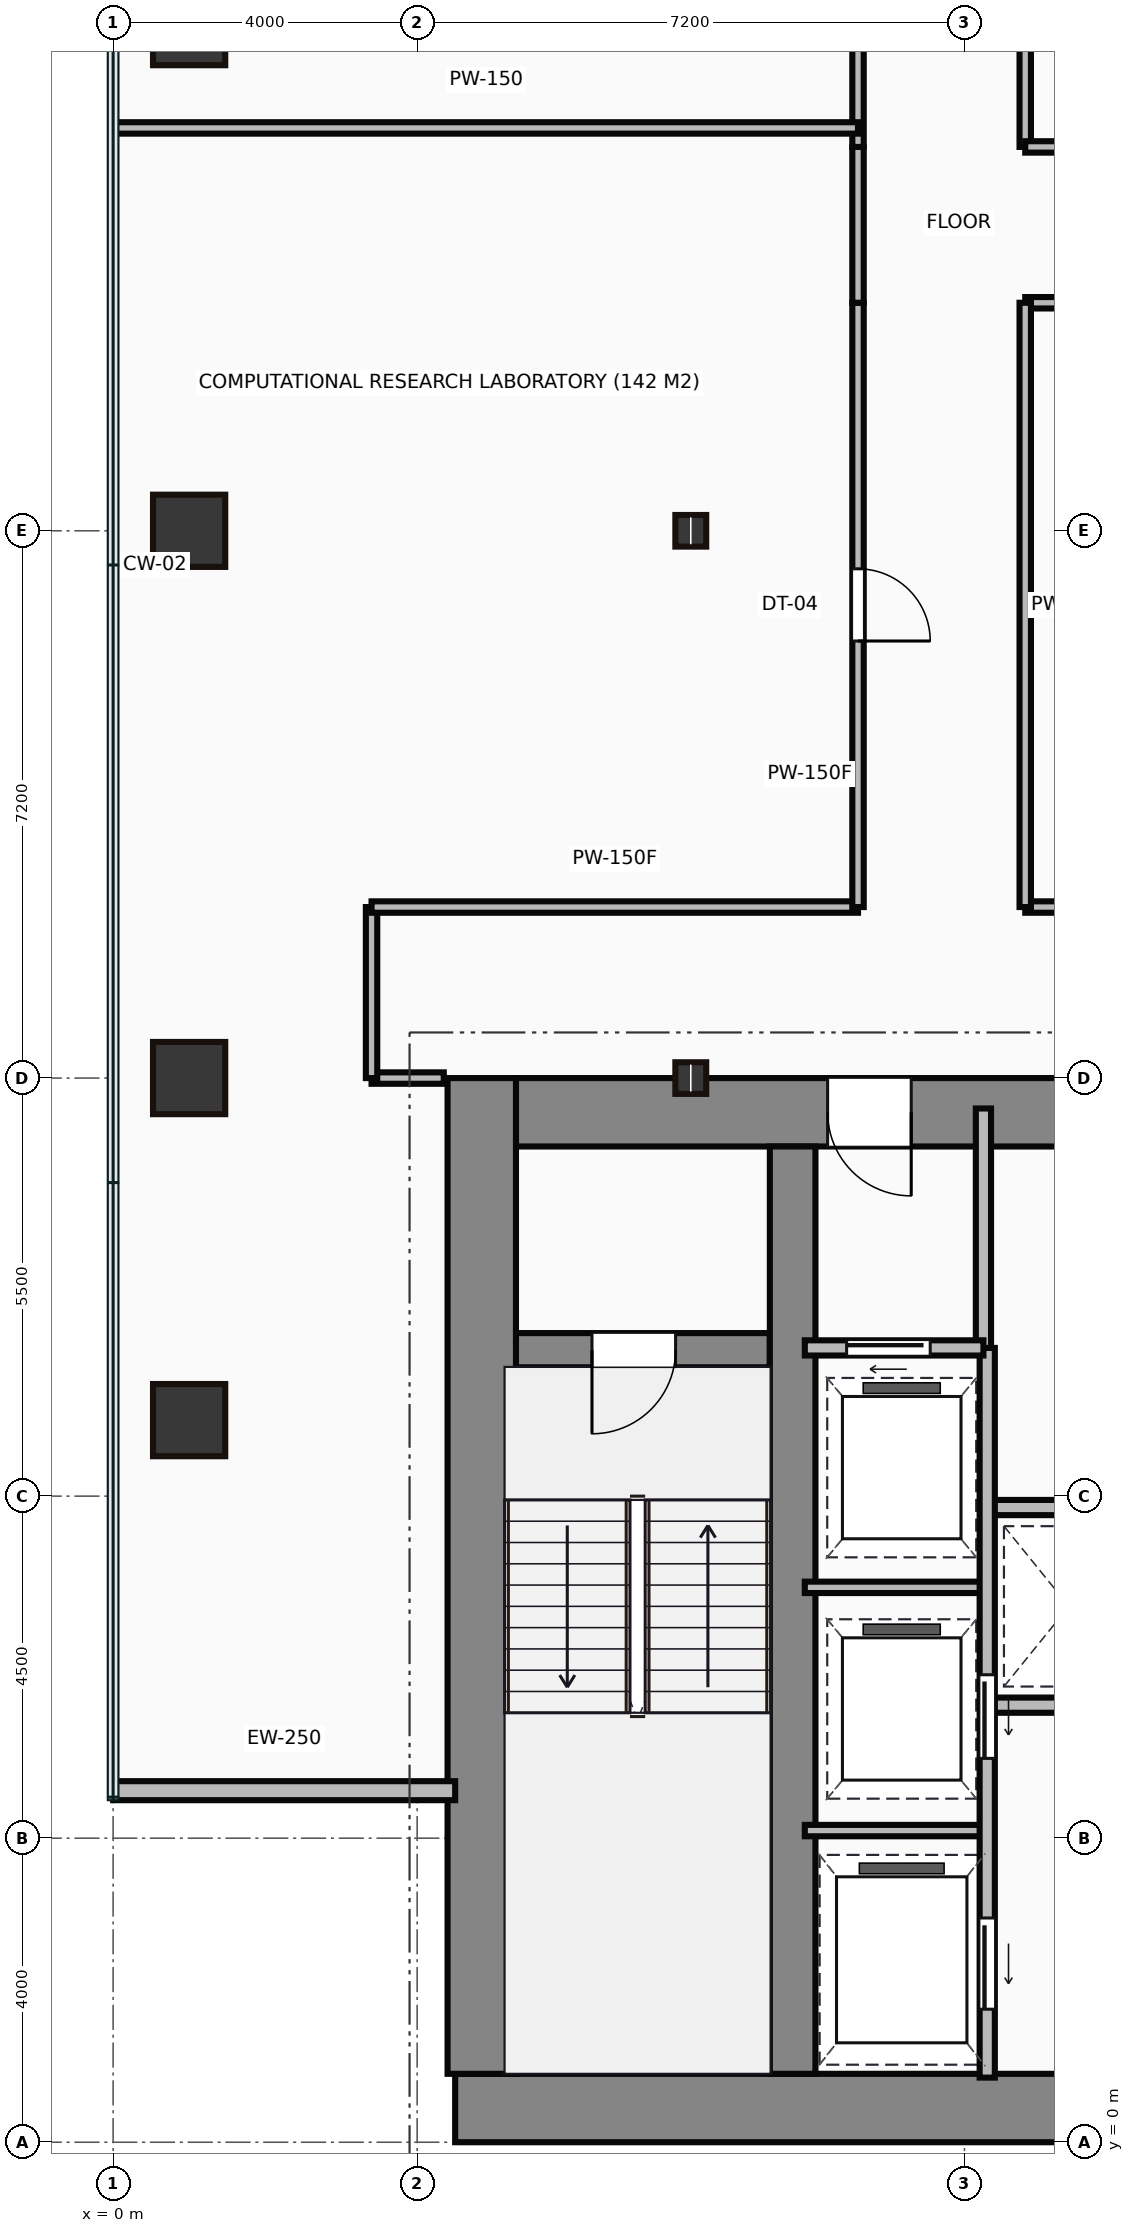
"""IFC4 building model, lengths in metres.
Left out: names, types, materials, properties, quantities, classifications, styles, units other than length and angle.
Written with IfcOpenShell. Run it as: python <this file> out.ifc"""

import sys

from ifc_helpers import new_model, si_unit, direction, frame, frame_2d, origin, origin_2d, place, context, subcontext, project, spatial, rectangle, hollow_rectangle, i_section, extrude, source, transform, mapped, element, fill, save


model = new_model("IFC4")
c1 = context("Model", 3, precision=1e-05, world=origin(), true_north=direction((0.0, 1.0)))
c2 = subcontext(c1, "Body", "Model", "MODEL_VIEW")
j1 = project(units=[si_unit("LENGTHUNIT", "METRE"), si_unit("PLANEANGLEUNIT", "RADIAN")], contexts=[c1])
p1 = place(None, origin())
s1 = spatial("IfcSite", under=j1, at=p1, CompositionType="ELEMENT")
p2 = place(p1, origin())
s2 = spatial("IfcBuilding", under=s1, at=p2, CompositionType="ELEMENT")
p3 = place(p2, frame((0.0, 0.0, 61.7)))
s3 = spatial("IfcBuildingStorey", under=s2, at=p3, CompositionType="ELEMENT", Elevation=61.7)
m1 = source(origin(), c2, "Body", "SweptSolid", [
    extrude(rectangle(XDim=29.5, YDim=0.9, at=frame_2d((14.75, 0.0))), origin(), (0.0, 0.0, 1.0), 3.65),
])
p4 = place(p3, frame((4.5, 0.45, 0.0), z_axis=(0.0, 0.0, 1.0), x_axis=(1.0, 0.0, 0.0)))
e1 = element("IfcWall", 1, at=p4, inside=s3, PredefinedType="SHEAR", context=c2, shape_type="MappedRepresentation", body=[
    mapped(m1, transform((0.0, 0.0, 0.0))),
])
m2 = source(origin(), c2, "Body", "SweptSolid", [
    extrude(rectangle(XDim=13.1, YDim=0.9, at=frame_2d((6.55, 0.0))), origin(), (0.0, 0.0, 1.0), 3.65),
])
p5 = place(p3, frame((4.85, 0.9, 0.0), z_axis=(0.0, 0.0, 1.0), x_axis=(0.0, 1.0, 0.0)))
e2 = element("IfcWall", 2, at=p5, inside=s3, PredefinedType="SHEAR", context=c2, shape_type="MappedRepresentation", body=[
    mapped(m2, transform((0.0, 0.0, 0.0))),
])
m3 = source(origin(), c2, "Body", "SweptSolid", [
    extrude(rectangle(XDim=9.1, YDim=0.9, at=frame_2d((4.55, 0.0))), origin(), (0.0, 0.0, 1.0), 3.65),
])
p6 = place(p3, frame((5.3, 13.55, 0.0), z_axis=(0.0, 0.0, 1.0), x_axis=(1.0, 0.0, 0.0)))
e3 = element("IfcWall", 3, at=p6, inside=s3, PredefinedType="SHEAR", context=c2, shape_type="MappedRepresentation", body=[
    mapped(m3, transform((0.0, 0.0, 0.0))),
])
p7 = place(p6, frame((4.1, 0.0, 0.0)))
e4 = element("IfcOpeningElement", 4, at=p7, cuts=e3, PredefinedType="OPENING", context=c2, shape_type="SweptSolid", body=[
    extrude(rectangle(XDim=1.1, YDim=2.15, at=frame_2d((0.55, 1.075))), frame((0.0, 0.46, 0.0), z_axis=(0.0, -1.0, 0.0), x_axis=(1.0, 0.0, 0.0)), (0.0, 0.0, 1.0), 0.92),
])
m4 = source(origin(), c2, "Body", "SweptSolid", [
    extrude(rectangle(XDim=12.2, YDim=0.6, at=frame_2d((6.1, 0.0))), origin(), (0.0, 0.0, 1.0), 3.65),
])
p8 = place(p3, frame((8.94, 0.9, 0.0), z_axis=(0.0, 0.0, 1.0), x_axis=(0.0, 1.0, 0.0)))
e5 = element("IfcWall", 5, at=p8, inside=s3, PredefinedType="SHEAR", context=c2, shape_type="MappedRepresentation", body=[
    mapped(m4, transform((0.0, 0.0, 0.0))),
])
m5 = source(origin(), c2, "Body", "SweptSolid", [
    extrude(rectangle(XDim=3.39, YDim=0.45, at=frame_2d((1.695, 0.0))), origin(), (0.0, 0.0, 1.0), 3.65),
])
p9 = place(p3, frame((5.25, 10.42, 0.0), z_axis=(0.0, 0.0, 1.0), x_axis=(1.0, 0.0, 0.0)))
e6 = element("IfcWall", 6, at=p9, inside=s3, PredefinedType="SHEAR", context=c2, shape_type="MappedRepresentation", body=[
    mapped(m5, transform((0.0, 0.0, 0.0))),
])
p10 = place(p9, frame((1.05, 0.0, 0.0)))
e7 = element("IfcOpeningElement", 7, at=p10, cuts=e6, PredefinedType="OPENING", context=c2, shape_type="SweptSolid", body=[
    extrude(rectangle(XDim=1.1, YDim=2.15, at=frame_2d((0.55, 1.075))), frame((0.0, 0.235, 0.0), z_axis=(0.0, -1.0, 0.0), x_axis=(1.0, 0.0, 0.0)), (0.0, 0.0, 1.0), 0.47),
])
m6 = source(origin(), c2, "Body", "SweptSolid", [
    extrude(hollow_rectangle(XDim=0.95, YDim=0.95, WallThickness=0.045, at=origin_2d()), origin(), (0.0, 0.0, 1.0), 3.65),
])
for number, where, z_axis, x_axis in (
    (8, (1.0, 9.5, 0.0), (0.0, 0.0, 1.0), (1.0, 0.0, 0.0)),
    (9, (1.0, 14.0, 0.0), (0.0, 0.0, 1.0), (1.0, 0.0, 0.0)),
    (10, (1.0, 21.2, 0.0), (0.0, 0.0, 1.0), (1.0, 0.0, 0.0)),
    (11, (1.0, 27.8, 0.0), (0.0, 0.0, 1.0), (1.0, 0.0, 0.0)),
):
    element("IfcColumn", number, at=place(p3, frame(where, z_axis=z_axis, x_axis=x_axis)), inside=s3, PredefinedType="COLUMN", context=c2, shape_type="MappedRepresentation", body=[
        mapped(m6, transform((0.0, 0.0, 0.0))),
    ])
m7 = source(origin(), c2, "Body", "SweptSolid", [
    extrude(i_section(OverallWidth=0.406, OverallDepth=0.416, WebThickness=0.03, FlangeThickness=0.048, at=origin_2d()), origin(), (0.0, 0.0, 1.0), 3.65),
])
for number, where, z_axis, x_axis in (
    (12, (7.6, 14.0, 0.0), (0.0, 0.0, 1.0), (1.0, 0.0, 0.0)),
    (13, (7.6, 21.2, 0.0), (0.0, 0.0, 1.0), (1.0, 0.0, 0.0)),
):
    element("IfcColumn", number, at=place(p3, frame(where, z_axis=z_axis, x_axis=x_axis)), inside=s3, PredefinedType="COLUMN", context=c2, shape_type="MappedRepresentation", body=[
        mapped(m7, transform((0.0, 0.0, 0.0))),
    ])
m8 = source(origin(), c2, "Body", "SweptSolid", [
    extrude(rectangle(XDim=4.5, YDim=0.25, at=frame_2d((2.25, 0.0))), origin(), (0.0, 0.0, 1.0), 3.4),
])
p11 = place(p3, frame((0.0, 4.625, 0.0), z_axis=(0.0, 0.0, 1.0), x_axis=(1.0, 0.0, 0.0)))
e14 = element("IfcWall", 14, at=p11, inside=s3, PredefinedType="STANDARD", context=c2, shape_type="MappedRepresentation", body=[
    mapped(m8, transform((0.0, 0.0, 0.0))),
])
m9 = source(origin(), c2, "Body", "SweptSolid", [
    extrude(rectangle(XDim=3.18, YDim=0.2, at=frame_2d((1.59, 0.0))), origin(), (0.0, 0.0, 1.0), 3.4),
])
p12 = place(p3, frame((11.45, 10.42, 0.0), z_axis=(0.0, 0.0, 1.0), x_axis=(0.0, 1.0, 0.0)))
e15 = element("IfcWall", 15, at=p12, inside=s3, PredefinedType="PARTITIONING", context=c2, shape_type="MappedRepresentation", body=[
    mapped(m9, transform((0.0, 0.0, 0.0))),
])
m10 = source(origin(), c2, "Body", "SweptSolid", [
    extrude(rectangle(XDim=2.35, YDim=0.2, at=frame_2d((1.175, 0.0))), origin(), (0.0, 0.0, 1.0), 3.4),
])
p13 = place(p3, frame((9.1, 10.45, 0.0), z_axis=(0.0, 0.0, 1.0), x_axis=(1.0, 0.0, 0.0)))
e16 = element("IfcWall", 16, at=p13, inside=s3, PredefinedType="PARTITIONING", context=c2, shape_type="MappedRepresentation", body=[
    mapped(m10, transform((0.0, 0.0, 0.0))),
])
p14 = place(p13, frame((0.55, 0.0, 0.0)))
e17 = element("IfcOpeningElement", 17, at=p14, cuts=e16, PredefinedType="OPENING", context=c2, shape_type="SweptSolid", body=[
    extrude(rectangle(XDim=1.1, YDim=2.15, at=frame_2d((0.55, 1.075))), frame((0.0, 0.11, 0.0), z_axis=(0.0, -1.0, 0.0), x_axis=(1.0, 0.0, 0.0)), (0.0, 0.0, 1.0), 0.22),
])
m11 = source(origin(), c2, "Body", "SweptSolid", [
    extrude(rectangle(XDim=9.6, YDim=0.2, at=frame_2d((4.8, 0.0))), origin(), (0.0, 0.0, 1.0), 3.4),
])
p15 = place(p3, frame((11.5, 0.85, 0.0), z_axis=(0.0, 0.0, 1.0), x_axis=(0.0, 1.0, 0.0)))
e18 = element("IfcWall", 18, at=p15, inside=s3, PredefinedType="PARTITIONING", context=c2, shape_type="MappedRepresentation", body=[
    mapped(m11, transform((0.0, 0.0, 0.0))),
])
p16 = place(p15, frame((4.2, 0.0, 0.0)))
e19 = element("IfcOpeningElement", 19, at=p16, cuts=e18, PredefinedType="OPENING", context=c2, shape_type="SweptSolid", body=[
    extrude(rectangle(XDim=1.1, YDim=2.15, at=frame_2d((0.55, 1.075))), frame((0.0, 0.11, 0.0), z_axis=(0.0, -1.0, 0.0), x_axis=(1.0, 0.0, 0.0)), (0.0, 0.0, 1.0), 0.22),
])
p17 = place(p15, frame((0.9, 0.0, 0.0)))
e20 = element("IfcOpeningElement", 20, at=p17, cuts=e18, PredefinedType="OPENING", context=c2, shape_type="SweptSolid", body=[
    extrude(rectangle(XDim=1.2, YDim=2.15, at=frame_2d((0.6, 1.075))), frame((0.0, 0.11, 0.0), z_axis=(0.0, -1.0, 0.0), x_axis=(1.0, 0.0, 0.0)), (0.0, 0.0, 1.0), 0.22),
])
m12 = source(origin(), c2, "Body", "SweptSolid", [
    extrude(rectangle(XDim=2.4, YDim=0.15, at=frame_2d((1.2, 0.0))), origin(), (0.0, 0.0, 1.0), 3.4),
])
for number, where, z_axis, x_axis in (
    (21, (9.1, 4.1, 0.0), (0.0, 0.0, 1.0), (1.0, 0.0, 0.0)),
    (22, (9.1, 7.3, 0.0), (0.0, 0.0, 1.0), (1.0, 0.0, 0.0)),
):
    element("IfcWall", number, at=place(p3, frame(where, z_axis=z_axis, x_axis=x_axis)), inside=s3, PredefinedType="PARTITIONING", context=c2, shape_type="MappedRepresentation", body=[
        mapped(m12, transform((0.0, 0.0, 0.0))),
    ])
m13 = source(origin(), c2, "Body", "SweptSolid", [
    extrude(rectangle(XDim=11.85, YDim=0.2, at=frame_2d((5.925, 0.0))), origin(), (0.0, 0.0, 1.0), 3.4),
])
for number, where, z_axis, x_axis in (
    (23, (11.55, 5.75, 0.0), (0.0, 0.0, 1.0), (1.0, 0.0, 0.0)),
    (24, (11.55, 8.35, 0.0), (0.0, 0.0, 1.0), (1.0, 0.0, 0.0)),
):
    element("IfcWall", number, at=place(p3, frame(where, z_axis=z_axis, x_axis=x_axis)), inside=s3, PredefinedType="PARTITIONING", context=c2, shape_type="MappedRepresentation", body=[
        mapped(m13, transform((0.0, 0.0, 0.0))),
    ])
m14 = source(origin(), c2, "Body", "SweptSolid", [
    extrude(rectangle(XDim=0.95, YDim=0.15, at=frame_2d((0.475, 0.0))), origin(), (0.0, 0.0, 1.0), 2.625),
])
p18 = place(p3, frame((4.35, 14.0, 0.0), z_axis=(0.0, 0.0, 1.0), x_axis=(-1.0, 0.0, 0.0)))
e25 = element("IfcWall", 25, at=p18, inside=s3, PredefinedType="PARTITIONING", context=c2, shape_type="MappedRepresentation", body=[
    mapped(m14, transform((0.0, 0.0, 0.0))),
])
m15 = source(origin(), c2, "Body", "SweptSolid", [
    extrude(rectangle(XDim=2.25, YDim=0.15, at=frame_2d((1.125, 0.0))), origin(), (0.0, 0.0, 1.0), 3.4),
])
p19 = place(p3, frame((3.4, 14.0, 0.0), z_axis=(0.0, 0.0, 1.0), x_axis=(0.0, 1.0, 0.0)))
e26 = element("IfcWall", 26, at=p19, inside=s3, PredefinedType="PARTITIONING", context=c2, shape_type="MappedRepresentation", body=[
    mapped(m15, transform((0.0, 0.0, 0.0))),
])
m16 = source(origin(), c2, "Body", "SweptSolid", [
    extrude(rectangle(XDim=6.4, YDim=0.15, at=frame_2d((3.2, 0.0))), origin(), (0.0, 0.0, 1.0), 3.4),
])
p20 = place(p3, frame((3.4, 16.25, 0.0), z_axis=(0.0, 0.0, 1.0), x_axis=(1.0, 0.0, 0.0)))
e27 = element("IfcWall", 27, at=p20, inside=s3, PredefinedType="PARTITIONING", context=c2, shape_type="MappedRepresentation", body=[
    mapped(m16, transform((0.0, 0.0, 0.0))),
])
m17 = source(origin(), c2, "Body", "SweptSolid", [
    extrude(rectangle(XDim=7.95, YDim=0.15, at=frame_2d((3.975, 0.0))), origin(), (0.0, 0.0, 1.0), 3.4),
])
p21 = place(p3, frame((9.8, 16.25, 0.0), z_axis=(0.0, 0.0, 1.0), x_axis=(0.0, 1.0, 0.0)))
e28 = element("IfcWall", 28, at=p21, inside=s3, PredefinedType="PARTITIONING", context=c2, shape_type="MappedRepresentation", body=[
    mapped(m17, transform((0.0, 0.0, 0.0))),
])
p22 = place(p21, frame((3.5, 0.0, 0.0)))
e29 = element("IfcOpeningElement", 29, at=p22, cuts=e28, PredefinedType="OPENING", context=c2, shape_type="SweptSolid", body=[
    extrude(rectangle(XDim=0.95, YDim=2.15, at=frame_2d((0.475, 1.075))), frame((0.0, 0.085, 0.0), z_axis=(0.0, -1.0, 0.0), x_axis=(1.0, 0.0, 0.0)), (0.0, 0.0, 1.0), 0.17),
])
m18 = source(origin(), c2, "Body", "SweptSolid", [
    extrude(rectangle(XDim=2.05, YDim=0.15, at=frame_2d((1.025, 0.0))), origin(), (0.0, 0.0, 1.0), 3.4),
])
p23 = place(p3, frame((9.8, 24.2, 0.0), z_axis=(0.0, 0.0, 1.0), x_axis=(0.0, 1.0, 0.0)))
e30 = element("IfcWall", 30, at=p23, inside=s3, PredefinedType="PARTITIONING", context=c2, shape_type="MappedRepresentation", body=[
    mapped(m18, transform((0.0, 0.0, 0.0))),
])
m19 = source(origin(), c2, "Body", "SweptSolid", [
    extrude(rectangle(XDim=9.75, YDim=0.15, at=frame_2d((4.875, 0.0))), origin(), (0.0, 0.0, 1.0), 3.4),
])
p24 = place(p3, frame((9.8, 26.25, 0.0), z_axis=(0.0, 0.0, 1.0), x_axis=(0.0, 1.0, 0.0)))
e31 = element("IfcWall", 31, at=p24, inside=s3, PredefinedType="PARTITIONING", context=c2, shape_type="MappedRepresentation", body=[
    mapped(m19, transform((0.0, 0.0, 0.0))),
])
p25 = place(p24, frame((4.4, 0.0, 0.0)))
e32 = element("IfcOpeningElement", 32, at=p25, cuts=e31, PredefinedType="OPENING", context=c2, shape_type="SweptSolid", body=[
    extrude(rectangle(XDim=0.95, YDim=2.15, at=frame_2d((0.475, 1.075))), frame((0.0, 0.085, 0.0), z_axis=(0.0, -1.0, 0.0), x_axis=(1.0, 0.0, 0.0)), (0.0, 0.0, 1.0), 0.17),
])
p26 = place(p3, frame((12.0, 36.0, 0.0), z_axis=(0.0, 0.0, 1.0), x_axis=(0.0, -1.0, 0.0)))
e33 = element("IfcWall", 33, at=p26, inside=s3, PredefinedType="PARTITIONING", context=c2, shape_type="MappedRepresentation", body=[
    mapped(m19, transform((0.0, 0.0, 0.0))),
])
m20 = source(origin(), c2, "Body", "SweptSolid", [
    extrude(rectangle(XDim=18.4, YDim=0.15, at=frame_2d((9.2, 0.0))), origin(), (0.0, 0.0, 1.0), 3.4),
])
p27 = place(p3, frame((12.0, 26.25, 0.0), z_axis=(0.0, 0.0, 1.0), x_axis=(1.0, 0.0, 0.0)))
e34 = element("IfcWall", 34, at=p27, inside=s3, PredefinedType="PARTITIONING", context=c2, shape_type="MappedRepresentation", body=[
    mapped(m20, transform((0.0, 0.0, 0.0))),
])
p28 = place(p27, frame((10.595, 0.0, 0.0)))
e35 = element("IfcOpeningElement", 35, at=p28, cuts=e34, PredefinedType="OPENING", context=c2, shape_type="SweptSolid", body=[
    extrude(rectangle(XDim=0.95, YDim=2.15, at=frame_2d((0.475, 1.075))), frame((0.0, 0.085, 0.0), z_axis=(0.0, -1.0, 0.0), x_axis=(1.0, 0.0, 0.0)), (0.0, 0.0, 1.0), 0.17),
])
p29 = place(p3, frame((12.0, 16.25, 0.0), z_axis=(0.0, 0.0, 1.0), x_axis=(1.0, 0.0, 0.0)))
e36 = element("IfcWall", 36, at=p29, inside=s3, PredefinedType="PARTITIONING", context=c2, shape_type="MappedRepresentation", body=[
    mapped(m20, transform((0.0, 0.0, 0.0))),
])
p30 = place(p29, frame((8.725, 0.0, 0.0)))
e37 = element("IfcOpeningElement", 37, at=p30, cuts=e36, PredefinedType="OPENING", context=c2, shape_type="SweptSolid", body=[
    extrude(rectangle(XDim=0.95, YDim=2.15, at=frame_2d((0.475, 1.075))), frame((0.0, 0.085, 0.0), z_axis=(0.0, -1.0, 0.0), x_axis=(1.0, 0.0, 0.0)), (0.0, 0.0, 1.0), 0.17),
])
p31 = place(p3, frame((30.4, 24.2, 0.0), z_axis=(0.0, 0.0, 1.0), x_axis=(-1.0, 0.0, 0.0)))
e38 = element("IfcWall", 38, at=p31, inside=s3, PredefinedType="PARTITIONING", context=c2, shape_type="MappedRepresentation", body=[
    mapped(m20, transform((0.0, 0.0, 0.0))),
])
p32 = place(p3, frame((12.0, 24.2, 0.0), z_axis=(0.0, 0.0, 1.0), x_axis=(0.0, -1.0, 0.0)))
e39 = element("IfcWall", 39, at=p32, inside=s3, PredefinedType="PARTITIONING", context=c2, shape_type="MappedRepresentation", body=[
    mapped(m17, transform((0.0, 0.0, 0.0))),
])
m21 = source(origin(), c2, "Body", "SweptSolid", [
    extrude(rectangle(XDim=9.78, YDim=0.15, at=frame_2d((4.89, 0.0))), origin(), (0.0, 0.0, 1.0), 3.4),
])
p33 = place(p3, frame((0.02, 26.5, 0.0), z_axis=(0.0, 0.0, 1.0), x_axis=(1.0, 0.0, 0.0)))
e40 = element("IfcWall", 40, at=p33, inside=s3, PredefinedType="PARTITIONING", context=c2, shape_type="MappedRepresentation", body=[
    mapped(m21, transform((0.0, 0.0, 0.0))),
])
m22 = source(origin(), c2, "Body", "SweptSolid", [
    extrude(rectangle(XDim=1.1, YDim=2.15, at=frame_2d((0.55, 1.075))), frame((0.0, 0.025, 0.0), z_axis=(0.0, -1.0, 0.0), x_axis=(1.0, 0.0, 0.0)), (0.0, 0.0, 1.0), 0.05),
])
p34 = place(p10, frame((1.1, 0.0, 0.0), z_axis=(0.0, 0.0, 1.0), x_axis=(-1.0, 0.0, 0.0)))
e41 = element("IfcDoor", 41, at=p34, inside=s3, OperationType="SINGLE_SWING_LEFT", PredefinedType="DOOR", context=c2, shape_type="MappedRepresentation", body=[
    mapped(m22, transform((0.0, 0.0, 0.0))),
])
fill(e7, e41)
p35 = place(p7, origin())
e42 = element("IfcDoor", 42, at=p35, inside=s3, OperationType="SINGLE_SWING_RIGHT", PredefinedType="DOOR", context=c2, shape_type="MappedRepresentation", body=[
    mapped(m22, transform((0.0, 0.0, 0.0))),
])
fill(e4, e42)
p36 = place(p14, origin())
e43 = element("IfcDoor", 43, at=p36, inside=s3, OperationType="SLIDING_TO_LEFT", PredefinedType="DOOR", context=c2, shape_type="MappedRepresentation", body=[
    mapped(m22, transform((0.0, 0.0, 0.0))),
])
fill(e17, e43)
p37 = place(p16, frame((1.1, 0.0, 0.0), z_axis=(0.0, 0.0, 1.0), x_axis=(-1.0, 0.0, 0.0)))
e44 = element("IfcDoor", 44, at=p37, inside=s3, OperationType="SLIDING_TO_LEFT", PredefinedType="DOOR", context=c2, shape_type="MappedRepresentation", body=[
    mapped(m22, transform((0.0, 0.0, 0.0))),
])
fill(e19, e44)
m23 = source(origin(), c2, "Body", "SweptSolid", [
    extrude(rectangle(XDim=1.2, YDim=2.15, at=frame_2d((0.6, 1.075))), frame((0.0, 0.025, 0.0), z_axis=(0.0, -1.0, 0.0), x_axis=(1.0, 0.0, 0.0)), (0.0, 0.0, 1.0), 0.05),
])
p38 = place(p17, frame((1.2, 0.0, 0.0), z_axis=(0.0, 0.0, 1.0), x_axis=(-1.0, 0.0, 0.0)))
e45 = element("IfcDoor", 45, at=p38, inside=s3, OperationType="SLIDING_TO_LEFT", PredefinedType="DOOR", context=c2, shape_type="MappedRepresentation", body=[
    mapped(m23, transform((0.0, 0.0, 0.0))),
])
fill(e20, e45)
m24 = source(origin(), c2, "Body", "SweptSolid", [
    extrude(rectangle(XDim=0.95, YDim=2.15, at=frame_2d((0.475, 1.075))), frame((0.0, 0.025, 0.0), z_axis=(0.0, -1.0, 0.0), x_axis=(1.0, 0.0, 0.0)), (0.0, 0.0, 1.0), 0.05),
])
p39 = place(p22, origin())
e46 = element("IfcDoor", 46, at=p39, inside=s3, OperationType="SINGLE_SWING_LEFT", PredefinedType="DOOR", context=c2, shape_type="MappedRepresentation", body=[
    mapped(m24, transform((0.0, 0.0, 0.0))),
])
fill(e29, e46)
save(model, sys.argv[1])
